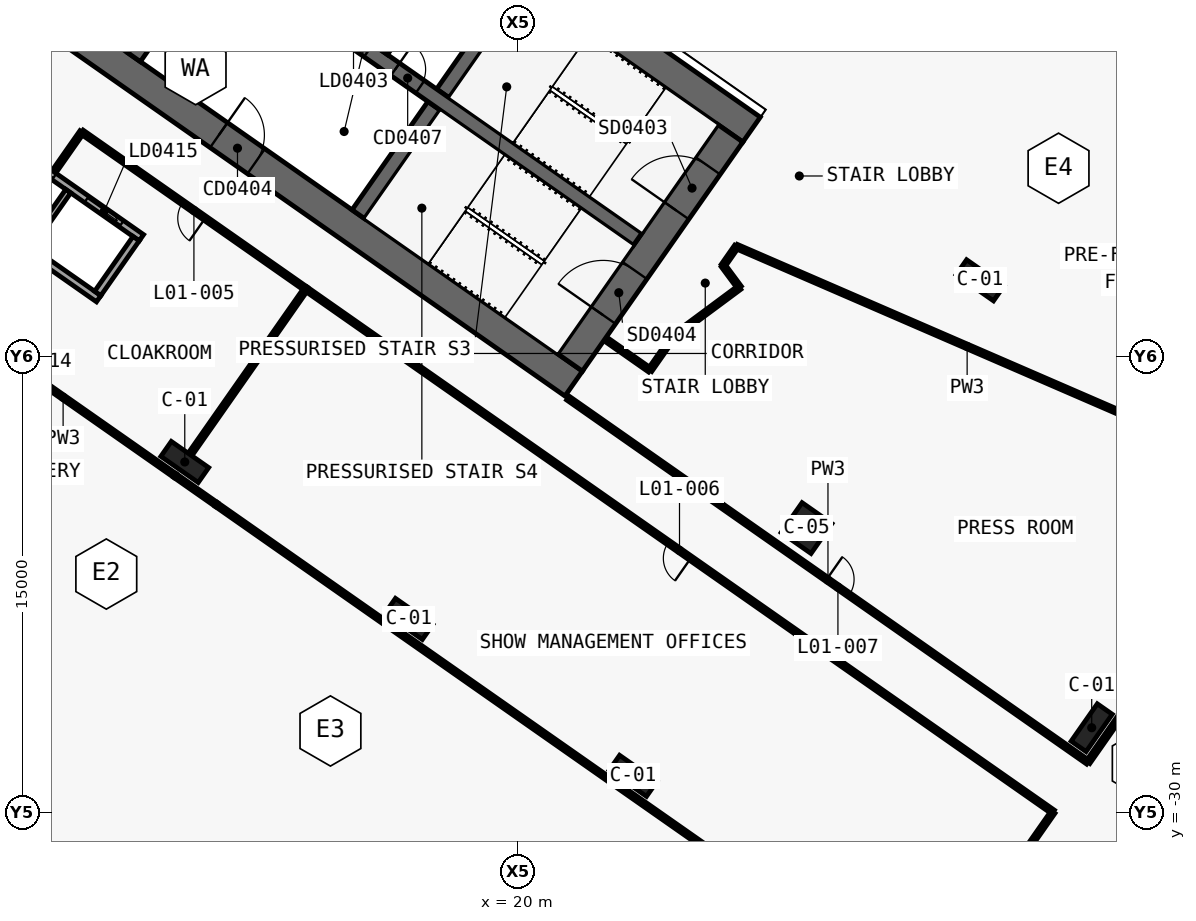
"""IFC4 building model, lengths in metres.
Left out: names, types, materials, properties, quantities, classifications, styles, units other than length and angle.
Written with IfcOpenShell. Run it as: python <this file> out.ifc"""

import sys

from ifc_helpers import new_model, si_unit, direction, frame, frame_2d, origin, origin_2d, place, context, subcontext, project, spatial, polyline, rectangle, outline, extrude, element, fill, save


model = new_model("IFC4")
c1 = context("Model", 3, precision=1e-05, world=origin(), true_north=direction((0.0, 1.0)))
c2 = subcontext(c1, "Body", "Model", "MODEL_VIEW")
j1 = project(units=[si_unit("LENGTHUNIT", "METRE"), si_unit("PLANEANGLEUNIT", "RADIAN")], contexts=[c1])
p1 = place(None, origin())
s1 = spatial("IfcSite", under=j1, at=p1, CompositionType="ELEMENT")
p2 = place(p1, origin())
s2 = spatial("IfcBuilding", under=s1, at=p2, CompositionType="ELEMENT")
p3 = place(p2, frame((0.0, 0.0, 9.0)))
s3 = spatial("IfcBuildingStorey", under=s2, at=p3, CompositionType="ELEMENT", Elevation=9.0)
p4 = place(p3, frame((-0.037, 11.867, 0.0), z_axis=(0.0, 0.0, 1.0), x_axis=(0.819155306259, -0.573571777746, 0.0)))
e1 = element("IfcWall", 1, at=p4, inside=s3, PredefinedType="SHEAR", context=c2, shape_type="SweptSolid", body=[
    extrude(outline(polyline([(33.837, 0.5), (0.0, 0.5), (0.7, -0.5), (33.837, -0.5), (33.837, 0.5)])), origin(), (0.0, 0.0, 1.0), 9.0),
])
p5 = place(p3, frame((-0.037, -0.585, 0.0), z_axis=(0.0, 0.0, 1.0), x_axis=(0.819157152511, -0.573569140985, 0.0)))
e2 = element("IfcWall", 2, at=p5, inside=s3, PredefinedType="SHEAR", context=c2, shape_type="SweptSolid", body=[
    extrude(outline(polyline([(26.695, 0.5), (0.0, 0.5), (0.7, -0.5), (26.695, -0.5), (26.695, 0.5)])), origin(), (0.0, 0.0, 1.0), 9.0),
])
p6 = place(p5, frame((1.045, 0.0, 0.0)))
e3 = element("IfcOpeningElement", 3, at=p6, cuts=e2, PredefinedType="OPENING", context=c2, shape_type="SweptSolid", body=[
    extrude(rectangle(XDim=1.5, YDim=2.1, at=frame_2d((0.75, 1.05))), frame((0.0, 0.51, 0.0), z_axis=(0.0, -1.0, 0.0), x_axis=(1.0, 0.0, 0.0)), (0.0, 0.0, 1.0), 1.02),
])
p7 = place(p5, frame((12.445, 0.0, 0.0)))
e4 = element("IfcOpeningElement", 4, at=p7, cuts=e2, PredefinedType="OPENING", context=c2, shape_type="SweptSolid", body=[
    extrude(rectangle(XDim=1.5, YDim=2.1, at=frame_2d((0.75, 1.05))), frame((0.0, 0.51, 0.0), z_axis=(0.0, -1.0, 0.0), x_axis=(1.0, 0.0, 0.0)), (0.0, 0.0, 1.0), 1.02),
])
p8 = place(p3, frame((21.708, -15.2, 0.0), z_axis=(0.0, 0.0, 1.0), x_axis=(0.573576324356, 0.819152122709, 0.0)))
e5 = element("IfcWall", 5, at=p8, inside=s3, PredefinedType="SHEAR", context=c2, shape_type="SweptSolid", body=[
    extrude(outline(polyline([(9.2, 0.5), (0.0, 0.5), (0.0, -0.5), (9.2, -0.5), (9.2, 0.5)])), origin(), (0.0, 0.0, 1.0), 9.0),
])
p9 = place(p8, frame((6.1, 0.0, 0.0)))
e6 = element("IfcOpeningElement", 6, at=p9, cuts=e5, PredefinedType="OPENING", context=c2, shape_type="SweptSolid", body=[
    extrude(rectangle(XDim=1.8, YDim=2.1, at=frame_2d((0.9, 1.05))), frame((0.0, 0.51, 0.0), z_axis=(0.0, -1.0, 0.0), x_axis=(1.0, 0.0, 0.0)), (0.0, 0.0, 1.0), 1.02),
])
p10 = place(p8, frame((1.9, 0.0, 0.0)))
e7 = element("IfcOpeningElement", 7, at=p10, cuts=e5, PredefinedType="OPENING", context=c2, shape_type="SweptSolid", body=[
    extrude(rectangle(XDim=1.8, YDim=2.1, at=frame_2d((0.9, 1.05))), frame((0.0, 0.51, 0.0), z_axis=(0.0, -1.0, 0.0), x_axis=(1.0, 0.0, 0.0)), (0.0, 0.0, 1.0), 1.02),
])
p11 = place(p3, frame((7.372, -5.162, 0.0), z_axis=(0.0, 0.0, 1.0), x_axis=(0.573594173421, 0.819139624372, 0.0)))
e8 = element("IfcWall", 8, at=p11, inside=s3, PredefinedType="SHEAR", context=c2, shape_type="SweptSolid", body=[
    extrude(outline(polyline([(0.0, 0.25), (0.0, -0.25), (4.35, -0.25), (4.35, 0.25), (0.0, 0.25)])), origin(), (0.0, 0.0, 1.0), 9.0),
])
p12 = place(p3, frame((14.745, -10.324, 0.0), z_axis=(0.0, 0.0, 1.0), x_axis=(0.57356780395, 0.819158088694, 0.0)))
e9 = element("IfcWall", 9, at=p12, inside=s3, PredefinedType="SHEAR", context=c2, shape_type="SweptSolid", body=[
    extrude(outline(polyline([(0.0, 0.25), (0.0, -0.25), (4.35, -0.25), (4.35, 0.25), (0.0, 0.25)])), origin(), (0.0, 0.0, 1.0), 9.0),
])
p13 = place(p3, frame((17.527, -6.352, 0.0), z_axis=(0.0, 0.0, 1.0), x_axis=(0.573530143085, 0.819184457233, 0.0)))
e10 = element("IfcWall", 10, at=p13, inside=s3, PredefinedType="SHEAR", context=c2, shape_type="SweptSolid", body=[
    extrude(outline(polyline([(4.35, -0.25), (4.35, 0.25), (0.0, 0.25), (0.0, -0.25), (4.35, -0.25)])), origin(), (0.0, 0.0, 1.0), 9.0),
])
p14 = place(p3, frame((2.638, 3.768, 0.0), z_axis=(0.0, 0.0, 1.0), x_axis=(0.819148977158, -0.573580816643, 0.0)))
e11 = element("IfcWall", 11, at=p14, inside=s3, PredefinedType="SHEAR", context=c2, shape_type="SweptSolid", body=[
    extrude(outline(polyline([(0.0, 0.25), (0.0, -0.25), (26.0, -0.25), (26.0, 0.25), (0.0, 0.25)])), origin(), (0.0, 0.0, 1.0), 9.0),
])
p15 = place(p14, frame((9.637, 0.0, 0.0)))
e12 = element("IfcOpeningElement", 12, at=p15, cuts=e11, PredefinedType="OPENING", context=c2, shape_type="SweptSolid", body=[
    extrude(rectangle(XDim=1.2, YDim=2.1, at=frame_2d((0.6, 1.05))), frame((0.0, 0.26, 0.0), z_axis=(0.0, -1.0, 0.0), x_axis=(1.0, 0.0, 0.0)), (0.0, 0.0, 1.0), 0.52),
])
p16 = place(p14, frame((11.812, 0.0, 0.0)))
e13 = element("IfcOpeningElement", 13, at=p16, cuts=e11, PredefinedType="OPENING", context=c2, shape_type="SweptSolid", body=[
    extrude(rectangle(XDim=1.2, YDim=2.1, at=frame_2d((0.6, 1.05))), frame((0.0, 0.26, 0.0), z_axis=(0.0, -1.0, 0.0), x_axis=(1.0, 0.0, 0.0)), (0.0, 0.0, 1.0), 0.52),
])
p17 = place(p14, frame((13.988, 0.0, 0.0)))
e14 = element("IfcOpeningElement", 14, at=p17, cuts=e11, PredefinedType="OPENING", context=c2, shape_type="SweptSolid", body=[
    extrude(rectangle(XDim=1.2, YDim=2.1, at=frame_2d((0.6, 1.05))), frame((0.0, 0.26, 0.0), z_axis=(0.0, -1.0, 0.0), x_axis=(1.0, 0.0, 0.0)), (0.0, 0.0, 1.0), 0.52),
])
p18 = place(p14, frame((16.262, 0.0, 0.0)))
e15 = element("IfcOpeningElement", 15, at=p18, cuts=e11, PredefinedType="OPENING", context=c2, shape_type="SweptSolid", body=[
    extrude(rectangle(XDim=1.0, YDim=2.1, at=frame_2d((0.5, 1.05))), frame((0.0, 0.26, 0.0), z_axis=(0.0, -1.0, 0.0), x_axis=(1.0, 0.0, 0.0)), (0.0, 0.0, 1.0), 0.52),
])
for number, where, z_axis, x_axis in (
    (16, (9.038, -18.475, 0.0), (0.0, 0.0, 1.0), (0.819, -0.574, 0.0)),
    (17, (16.41, -23.637, 0.0), (0.0, 0.0, 1.0), (0.819, -0.574, 0.0)),
    (18, (23.782, -28.799, 0.0), (0.0, 0.0, 1.0), (0.819, -0.574, 0.0)),
    (19, (35.197, -12.498, 0.0), (0.0, 0.0, 1.0), (0.819, -0.574, 0.0)),
    (20, (38.869, -27.216, 0.0), (0.0, 0.0, 1.0), (0.574, 0.819, 0.0)),
):
    element("IfcColumn", number, at=place(p3, frame(where, z_axis=z_axis, x_axis=x_axis)), inside=s3, PredefinedType="COLUMN", context=c2, shape_type="SweptSolid", body=[
        extrude(rectangle(XDim=1.5, YDim=0.6, at=origin_2d()), origin(), (0.0, 0.0, 1.0), 9.0),
    ])
p19 = place(p3, frame((29.49, -20.649, 0.0), z_axis=(0.0, 0.0, 1.0), x_axis=(0.819152044289, -0.573576436351, 0.0)))
e21 = element("IfcColumn", 21, at=p19, inside=s3, PredefinedType="COLUMN", context=c2, shape_type="SweptSolid", body=[
    extrude(rectangle(XDim=1.2, YDim=1.2, at=origin_2d()), origin(), (0.0, 0.0, 1.0), 9.0),
])
p20 = place(p3, frame((15.622, -5.018, 0.0), z_axis=(0.0, 0.0, 1.0), x_axis=(0.573594173421, 0.819139624372, 0.0)))
e22 = element("IfcWall", 22, at=p20, inside=s3, PredefinedType="SOLIDWALL", context=c2, shape_type="SweptSolid", body=[
    extrude(rectangle(XDim=4.35, YDim=0.2, at=frame_2d((2.175, 0.0))), origin(), (0.0, 0.0, 1.0), 9.0),
])
p21 = place(p3, frame((-2.887, -6.738, 0.0), z_axis=(0.0, 0.0, 1.0), x_axis=(0.819150280716, -0.573578954985, 0.0)))
e23 = element("IfcWall", 23, at=p21, inside=s3, PredefinedType="SOLIDWALL", context=c2, shape_type="SweptSolid", body=[
    extrude(rectangle(XDim=11.1, YDim=0.25, at=frame_2d((5.55, 0.0))), origin(), (0.0, 0.0, 1.0), 9.0),
])
p22 = place(p3, frame((-1.481, -4.731, 0.0), z_axis=(0.0, 0.0, 1.0), x_axis=(0.819150280716, -0.573578954985, 0.0)))
e24 = element("IfcWall", 24, at=p22, inside=s3, PredefinedType="SOLIDWALL", context=c2, shape_type="SweptSolid", body=[
    extrude(rectangle(XDim=11.1, YDim=0.25, at=frame_2d((5.55, 0.0))), origin(), (0.0, 0.0, 1.0), 9.0),
])
p23 = place(p22, frame((0.8, 0.0, 0.0)))
e25 = element("IfcOpeningElement", 25, at=p23, cuts=e24, PredefinedType="OPENING", context=c2, shape_type="SweptSolid", body=[
    extrude(rectangle(XDim=1.4, YDim=2.1, at=frame_2d((0.7, 1.05))), frame((0.0, 0.135, 0.0), z_axis=(0.0, -1.0, 0.0), x_axis=(1.0, 0.0, 0.0)), (0.0, 0.0, 1.0), 0.27),
])
p24 = place(p22, frame((3.5, 0.0, 0.0)))
e26 = element("IfcOpeningElement", 26, at=p24, cuts=e24, PredefinedType="OPENING", context=c2, shape_type="SweptSolid", body=[
    extrude(rectangle(XDim=1.4, YDim=2.1, at=frame_2d((0.7, 1.05))), frame((0.0, 0.135, 0.0), z_axis=(0.0, -1.0, 0.0), x_axis=(1.0, 0.0, 0.0)), (0.0, 0.0, 1.0), 0.27),
])
p25 = place(p22, frame((6.2, 0.0, 0.0)))
e27 = element("IfcOpeningElement", 27, at=p25, cuts=e24, PredefinedType="OPENING", context=c2, shape_type="SweptSolid", body=[
    extrude(rectangle(XDim=1.4, YDim=2.1, at=frame_2d((0.7, 1.05))), frame((0.0, 0.135, 0.0), z_axis=(0.0, -1.0, 0.0), x_axis=(1.0, 0.0, 0.0)), (0.0, 0.0, 1.0), 0.27),
])
p26 = place(p22, frame((8.9, 0.0, 0.0)))
e28 = element("IfcOpeningElement", 28, at=p26, cuts=e24, PredefinedType="OPENING", context=c2, shape_type="SweptSolid", body=[
    extrude(rectangle(XDim=1.4, YDim=2.1, at=frame_2d((0.7, 1.05))), frame((0.0, 0.135, 0.0), z_axis=(0.0, -1.0, 0.0), x_axis=(1.0, 0.0, 0.0)), (0.0, 0.0, 1.0), 0.27),
])
p27 = place(p3, frame((6.175, -12.93, 0.0), z_axis=(0.0, 0.0, 1.0), x_axis=(0.573559170999, 0.819164133348, 0.0)))
e29 = element("IfcWall", 29, at=p27, inside=s3, PredefinedType="SOLIDWALL", context=c2, shape_type="SweptSolid", body=[
    extrude(rectangle(XDim=2.2, YDim=0.25, at=frame_2d((1.1, 0.0))), origin(), (0.0, 0.0, 1.0), 9.0),
])
p28 = place(p3, frame((3.943, -11.367, 0.0), z_axis=(0.0, 0.0, 1.0), x_axis=(0.573507030513, 0.819200638399, 0.0)))
e30 = element("IfcWall", 30, at=p28, inside=s3, PredefinedType="SOLIDWALL", context=c2, shape_type="SweptSolid", body=[
    extrude(rectangle(XDim=2.2, YDim=0.2, at=frame_2d((1.1, 0.0))), origin(), (0.0, 0.0, 1.0), 9.0),
])
p29 = place(p3, frame((21.642, -16.375, 0.0), z_axis=(0.0, 0.0, 1.0), x_axis=(0.819148965066, -0.573580833911, 0.0)))
e31 = element("IfcWall", 31, at=p29, inside=s3, PredefinedType="PARTITIONING", context=c2, shape_type="SweptSolid", body=[
    extrude(rectangle(XDim=20.88, YDim=0.15, at=frame_2d((10.44, 0.0))), origin(), (0.0, 0.0, 1.0), 7.18),
])
p30 = place(p29, frame((10.39, 0.0, 0.0)))
e32 = element("IfcOpeningElement", 32, at=p30, cuts=e31, PredefinedType="OPENING", context=c2, shape_type="SweptSolid", body=[
    extrude(rectangle(XDim=0.9, YDim=2.1, at=frame_2d((0.45, 1.05))), frame((0.0, 0.085, 0.0), z_axis=(0.0, -1.0, 0.0), x_axis=(1.0, 0.0, 0.0)), (0.0, 0.0, 1.0), 0.17),
])
p31 = place(p3, frame((13.026, -12.783, 0.0), z_axis=(0.0, 0.0, 1.0), x_axis=(-0.81915291695, 0.57357519006, 0.0)))
e33 = element("IfcWall", 33, at=p31, inside=s3, PredefinedType="PARTITIONING", context=c2, shape_type="SweptSolid", body=[
    extrude(rectangle(XDim=9.002, YDim=0.15, at=frame_2d((4.501, 0.0))), origin(), (0.0, 0.0, 1.0), 7.18),
])
p32 = place(p31, frame((4.051, 0.0, 0.0)))
e34 = element("IfcOpeningElement", 34, at=p32, cuts=e33, PredefinedType="OPENING", context=c2, shape_type="SweptSolid", body=[
    extrude(rectangle(XDim=0.9, YDim=2.1, at=frame_2d((0.45, 1.05))), frame((0.0, 0.085, 0.0), z_axis=(0.0, -1.0, 0.0), x_axis=(1.0, 0.0, 0.0)), (0.0, 0.0, 1.0), 0.17),
])
p33 = place(p3, frame((37.599, -29.989, 0.0), z_axis=(0.0, 0.0, 1.0), x_axis=(-0.819154688631, 0.57357265982, 0.0)))
e35 = element("IfcWall", 35, at=p33, inside=s3, PredefinedType="PARTITIONING", context=c2, shape_type="SweptSolid", body=[
    extrude(rectangle(XDim=30.002, YDim=0.15, at=frame_2d((15.001, 0.0))), origin(), (0.0, 0.0, 1.0), 7.18),
])
p34 = place(p33, frame((14.551, 0.0, 0.0)))
e36 = element("IfcOpeningElement", 36, at=p34, cuts=e35, PredefinedType="OPENING", context=c2, shape_type="SweptSolid", body=[
    extrude(rectangle(XDim=0.9, YDim=2.1, at=frame_2d((0.45, 1.05))), frame((0.0, 0.085, 0.0), z_axis=(0.0, -1.0, 0.0), x_axis=(1.0, 0.0, 0.0)), (0.0, 0.0, 1.0), 0.17),
])
p35 = place(p3, frame((43.621, -21.388, 0.0), z_axis=(0.0, 0.0, 1.0), x_axis=(-0.57357799764, -0.819150951061, 0.0)))
e37 = element("IfcWall", 37, at=p35, inside=s3, PredefinedType="PARTITIONING", context=c2, shape_type="SweptSolid", body=[
    extrude(rectangle(XDim=8.5, YDim=0.15, at=frame_2d((4.25, 0.0))), origin(), (0.0, 0.0, 1.0), 8.6),
])
p36 = place(p3, frame((26.746, -12.014, 0.0), z_axis=(0.0, 0.0, 1.0), x_axis=(0.573761975376, 0.819022097146, 0.0)))
e38 = element("IfcWall", 38, at=p36, inside=s3, PredefinedType="PARTITIONING", context=c2, shape_type="SweptSolid", body=[
    extrude(rectangle(XDim=0.765, YDim=0.15, at=frame_2d((0.383, 0.0))), origin(), (0.0, 0.0, 1.0), 8.6),
])
p37 = place(p3, frame((27.185, -11.387, 0.0), z_axis=(0.0, 0.0, 1.0), x_axis=(0.917531384635, -0.397663372979, 0.0)))
e39 = element("IfcWall", 39, at=p37, inside=s3, PredefinedType="PARTITIONING", context=c2, shape_type="SweptSolid", body=[
    extrude(rectangle(XDim=16.536, YDim=0.15, at=frame_2d((8.268, 0.0))), origin(), (0.0, 0.0, 1.0), 7.18),
])
p38 = place(p3, frame((22.961, -14.49, 0.0), z_axis=(0.0, 0.0, 1.0), x_axis=(0.819109000826, -0.573637903879, 0.0)))
e40 = element("IfcWall", 40, at=p38, inside=s3, PredefinedType="PARTITIONING", context=c2, shape_type="SweptSolid", body=[
    extrude(rectangle(XDim=1.68, YDim=0.15, at=frame_2d((0.84, 0.0))), origin(), (0.0, 0.0, 1.0), 8.6),
])
p39 = place(p3, frame((24.337, -15.454, 0.0), z_axis=(0.0, 0.0, 1.0), x_axis=(0.573571252353, 0.819155674139, 0.0)))
e41 = element("IfcWall", 41, at=p39, inside=s3, PredefinedType="PARTITIONING", context=c2, shape_type="SweptSolid", body=[
    extrude(rectangle(XDim=1.354, YDim=0.15, at=frame_2d((0.677, 0.0))), origin(), (0.0, 0.0, 1.0), 8.6),
])
p40 = place(p3, frame((25.114, -14.345, 0.0), z_axis=(0.0, 0.0, 1.0), x_axis=(0.803211070557, 0.595694532571, 0.0)))
e42 = element("IfcWall", 42, at=p40, inside=s3, PredefinedType="PARTITIONING", context=c2, shape_type="SweptSolid", body=[
    extrude(rectangle(XDim=2.7, YDim=0.15, at=frame_2d((1.35, 0.0))), origin(), (0.0, 0.0, 1.0), 8.6),
])
p41 = place(p3, frame((27.282, -12.737, 0.0), z_axis=(0.0, 0.0, 1.0), x_axis=(-0.595869495235, 0.803081281471, 0.0)))
e43 = element("IfcWall", 43, at=p41, inside=s3, PredefinedType="PARTITIONING", context=c2, shape_type="SweptSolid", body=[
    extrude(rectangle(XDim=0.9, YDim=0.15, at=frame_2d((0.45, 0.0))), origin(), (0.0, 0.0, 1.0), 8.6),
])
p42 = place(p3, frame((13.024, -12.782, 0.0), z_axis=(0.0, 0.0, 1.0), x_axis=(-0.573556251799, -0.819166177294, 0.0)))
e44 = element("IfcWall", 44, at=p42, inside=s3, PredefinedType="PARTITIONING", context=c2, shape_type="SweptSolid", body=[
    extrude(rectangle(XDim=6.63, YDim=0.15, at=frame_2d((3.315, 0.0))), origin(), (0.0, 0.0, 1.0), 7.18),
])
p43 = place(p3, frame((8.722, -18.926, 0.0), z_axis=(0.0, 0.0, 1.0), x_axis=(-0.819141427692, 0.573591598124, 0.0)))
e45 = element("IfcWall", 45, at=p43, inside=s3, PredefinedType="PARTITIONING", context=c2, shape_type="SweptSolid", body=[
    extrude(rectangle(XDim=9.0, YDim=0.15, at=frame_2d((4.5, 0.0))), origin(), (0.0, 0.0, 1.0), 8.6),
])
p44 = place(p3, frame((4.763, -8.889, 0.0), z_axis=(0.0, 0.0, 1.0), x_axis=(0.573494057365, 0.819209720504, 0.0)))
e46 = element("IfcWall", 46, at=p44, inside=s3, PredefinedType="PARTITIONING", context=c2, shape_type="SweptSolid", body=[
    extrude(rectangle(XDim=1.55, YDim=0.15, at=frame_2d((0.775, 0.0))), origin(), (0.0, 0.0, 1.0), 7.18),
])
p45 = place(p3, frame((30.839, -34.412, 0.0), z_axis=(0.0, 0.0, 1.0), x_axis=(-0.819153188106, 0.573574802808, 0.0)))
e47 = element("IfcWall", 47, at=p45, inside=s3, PredefinedType="PARTITIONING", context=c2, shape_type="SweptSolid", body=[
    extrude(rectangle(XDim=25.351, YDim=0.15, at=frame_2d((12.675, 0.0))), origin(), (0.0, 0.0, 1.0), 8.6),
])
p46 = place(p3, frame((37.599, -29.989, 0.0), z_axis=(0.0, 0.0, 1.0), x_axis=(-0.573575034625, -0.819153025786, 0.0)))
e48 = element("IfcWall", 48, at=p46, inside=s3, PredefinedType="PARTITIONING", context=c2, shape_type="SweptSolid", body=[
    extrude(rectangle(XDim=1.745, YDim=0.15, at=frame_2d((0.872, 0.0))), origin(), (0.0, 0.0, 1.0), 8.6),
])
p47 = place(p3, frame((10.075, -19.873, 0.0), z_axis=(0.0, 0.0, 1.0), x_axis=(-0.819190252408, 0.573521865634, 0.0)))
e49 = element("IfcWall", 49, at=p47, inside=s3, PredefinedType="PARTITIONING", context=c2, shape_type="SweptSolid", body=[
    extrude(rectangle(XDim=1.652, YDim=0.15, at=frame_2d((0.826, 0.0))), origin(), (0.0, 0.0, 1.0), 7.58),
])
p48 = place(p18, origin())
e50 = element("IfcDoor", 50, at=p48, inside=s3, OperationType="SINGLE_SWING_RIGHT", PredefinedType="DOOR", context=c2, shape_type="SweptSolid", body=[
    extrude(rectangle(XDim=1.0, YDim=2.1, at=frame_2d((0.5, 1.05))), frame((0.0, 0.025, 0.0), z_axis=(0.0, -1.0, 0.0), x_axis=(1.0, 0.0, 0.0)), (0.0, 0.0, 1.0), 0.05),
])
fill(e15, e50)
p49 = place(p7, origin())
e51 = element("IfcDoor", 51, at=p49, inside=s3, OperationType="DOUBLE_DOOR_SINGLE_SWING", PredefinedType="DOOR", context=c2, shape_type="SweptSolid", body=[
    extrude(rectangle(XDim=1.5, YDim=2.1, at=frame_2d((0.75, 1.05))), frame((0.0, 0.025, 0.0), z_axis=(0.0, -1.0, 0.0), x_axis=(1.0, 0.0, 0.0)), (0.0, 0.0, 1.0), 0.05),
])
fill(e4, e51)
p50 = place(p9, origin())
e52 = element("IfcDoor", 52, at=p50, inside=s3, OperationType="DOUBLE_DOOR_SINGLE_SWING", PredefinedType="DOOR", context=c2, shape_type="SweptSolid", body=[
    extrude(rectangle(XDim=1.8, YDim=2.1, at=frame_2d((0.9, 1.05))), frame((0.0, 0.025, 0.0), z_axis=(0.0, -1.0, 0.0), x_axis=(1.0, 0.0, 0.0)), (0.0, 0.0, 1.0), 0.05),
])
fill(e6, e52)
p51 = place(p10, origin())
e53 = element("IfcDoor", 53, at=p51, inside=s3, OperationType="DOUBLE_DOOR_SINGLE_SWING", PredefinedType="DOOR", context=c2, shape_type="SweptSolid", body=[
    extrude(rectangle(XDim=1.8, YDim=2.1, at=frame_2d((0.9, 1.05))), frame((0.0, 0.025, 0.0), z_axis=(0.0, -1.0, 0.0), x_axis=(1.0, 0.0, 0.0)), (0.0, 0.0, 1.0), 0.05),
])
fill(e7, e53)
p52 = place(p25, origin())
e54 = element("IfcDoor", 54, at=p52, inside=s3, OperationType="SLIDING_TO_LEFT", PredefinedType="DOOR", context=c2, shape_type="SweptSolid", body=[
    extrude(rectangle(XDim=1.4, YDim=2.1, at=frame_2d((0.7, 1.05))), frame((0.0, 0.025, 0.0), z_axis=(0.0, -1.0, 0.0), x_axis=(1.0, 0.0, 0.0)), (0.0, 0.0, 1.0), 0.05),
])
fill(e27, e54)
p53 = place(p26, origin())
e55 = element("IfcDoor", 55, at=p53, inside=s3, OperationType="SLIDING_TO_RIGHT", PredefinedType="DOOR", context=c2, shape_type="SweptSolid", body=[
    extrude(rectangle(XDim=1.4, YDim=2.1, at=frame_2d((0.7, 1.05))), frame((0.0, 0.025, 0.0), z_axis=(0.0, -1.0, 0.0), x_axis=(1.0, 0.0, 0.0)), (0.0, 0.0, 1.0), 0.05),
])
fill(e28, e55)
p54 = place(p32, origin())
e56 = element("IfcDoor", 56, at=p54, inside=s3, OperationType="SINGLE_SWING_RIGHT", PredefinedType="DOOR", context=c2, shape_type="SweptSolid", body=[
    extrude(rectangle(XDim=0.9, YDim=2.1, at=frame_2d((0.45, 1.05))), frame((0.0, 0.025, 0.0), z_axis=(0.0, -1.0, 0.0), x_axis=(1.0, 0.0, 0.0)), (0.0, 0.0, 1.0), 0.05),
])
fill(e34, e56)
p55 = place(p34, origin())
e57 = element("IfcDoor", 57, at=p55, inside=s3, OperationType="SINGLE_SWING_RIGHT", PredefinedType="DOOR", context=c2, shape_type="SweptSolid", body=[
    extrude(rectangle(XDim=0.9, YDim=2.1, at=frame_2d((0.45, 1.05))), frame((0.0, 0.025, 0.0), z_axis=(0.0, -1.0, 0.0), x_axis=(1.0, 0.0, 0.0)), (0.0, 0.0, 1.0), 0.05),
])
fill(e36, e57)
p56 = place(p30, origin())
e58 = element("IfcDoor", 58, at=p56, inside=s3, OperationType="SINGLE_SWING_LEFT", PredefinedType="DOOR", context=c2, shape_type="SweptSolid", body=[
    extrude(rectangle(XDim=0.9, YDim=2.1, at=frame_2d((0.45, 1.05))), frame((0.0, 0.025, 0.0), z_axis=(0.0, -1.0, 0.0), x_axis=(1.0, 0.0, 0.0)), (0.0, 0.0, 1.0), 0.05),
])
fill(e32, e58)
save(model, sys.argv[1])
